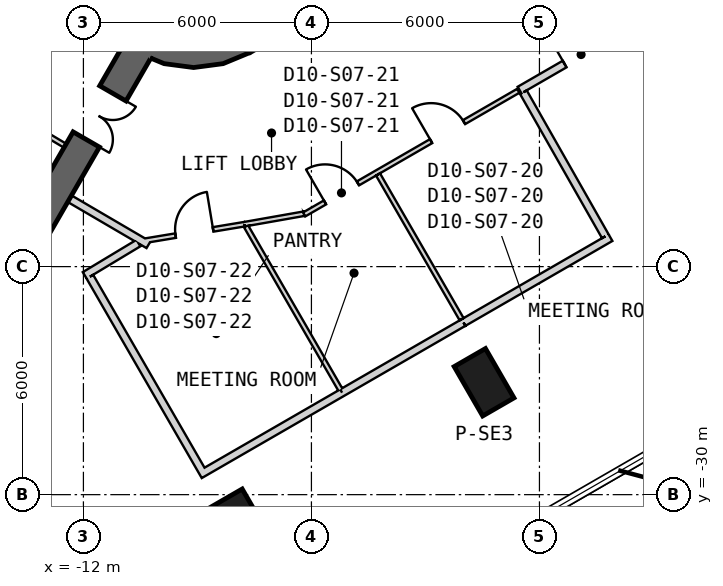
"""IFC4 building model, lengths in metres.
Left out: names, types, materials, properties, quantities, classifications, styles, units other than length and angle.
Written with IfcOpenShell. Run it as: python <this file> out.ifc"""

import sys

from ifc_helpers import new_model, si_unit, direction, frame, frame_2d, origin, origin_2d, place, context, subcontext, project, spatial, polyline, rectangle, outline, extrude, element, fill, save


model = new_model("IFC4")
c1 = context("Model", 3, precision=1e-05, world=origin(), true_north=direction((0.0, 1.0)))
c2 = subcontext(c1, "Body", "Model", "MODEL_VIEW")
j1 = project(units=[si_unit("LENGTHUNIT", "METRE"), si_unit("PLANEANGLEUNIT", "RADIAN")], contexts=[c1])
p1 = place(None, origin())
s1 = spatial("IfcSite", under=j1, at=p1, CompositionType="ELEMENT")
p2 = place(p1, origin())
s2 = spatial("IfcBuilding", under=s1, at=p2, CompositionType="ELEMENT")
p3 = place(p2, frame((0.0, 0.0, 131.6)))
s3 = spatial("IfcBuildingStorey", under=s2, at=p3, CompositionType="ELEMENT", Elevation=131.6)
for number, where, z_axis, x_axis in (
    (1, (-7.858, -30.738, 0.0), (0.0, 0.0, 1.0), (0.5, -0.866, 0.0)),
    (2, (-1.457, -27.043, 0.0), (0.0, 0.0, 1.0), (0.5, -0.866, 0.0)),
):
    element("IfcColumn", number, at=place(p3, frame(where, z_axis=z_axis, x_axis=x_axis)), inside=s3, PredefinedType="COLUMN", context=c2, shape_type="SweptSolid", body=[
        extrude(rectangle(XDim=1.5, YDim=0.95, at=origin_2d()), origin(), (0.0, 0.0, 1.0), 4.1),
    ])
p4 = place(p3, frame((-7.825, -17.97, 0.0), z_axis=(0.0, 0.0, 1.0), x_axis=(0.866028369851, 0.499994862586, 0.0)))
e3 = element("IfcWall", 3, at=p4, inside=s3, PredefinedType="SHEAR", context=c2, shape_type="SweptSolid", body=[
    extrude(rectangle(XDim=31.523, YDim=0.9, at=frame_2d((15.762, 0.0))), origin(), (0.0, 0.0, 1.0), 4.1),
])
p5 = place(p4, frame((7.062, 0.0, 0.0)))
e4 = element("IfcOpeningElement", 4, at=p5, cuts=e3, PredefinedType="OPENING", context=c2, shape_type="SweptSolid", body=[
    extrude(rectangle(XDim=1.2, YDim=2.4, at=frame_2d((0.6, 1.2))), frame((0.0, 0.46, 0.0), z_axis=(0.0, -1.0, 0.0), x_axis=(1.0, 0.0, 0.0)), (0.0, 0.0, 1.0), 0.92),
])
p6 = place(p4, frame((9.762, 0.0, 0.0)))
e5 = element("IfcOpeningElement", 5, at=p6, cuts=e3, PredefinedType="OPENING", context=c2, shape_type="SweptSolid", body=[
    extrude(rectangle(XDim=1.2, YDim=2.4, at=frame_2d((0.6, 1.2))), frame((0.0, 0.46, 0.0), z_axis=(0.0, -1.0, 0.0), x_axis=(1.0, 0.0, 0.0)), (0.0, 0.0, 1.0), 0.92),
])
p7 = place(p4, frame((12.462, 0.0, 0.0)))
e6 = element("IfcOpeningElement", 6, at=p7, cuts=e3, PredefinedType="OPENING", context=c2, shape_type="SweptSolid", body=[
    extrude(rectangle(XDim=1.2, YDim=2.4, at=frame_2d((0.6, 1.2))), frame((0.0, 0.46, 0.0), z_axis=(0.0, -1.0, 0.0), x_axis=(1.0, 0.0, 0.0)), (0.0, 0.0, 1.0), 0.92),
])
p8 = place(p4, frame((15.162, 0.0, 0.0)))
e7 = element("IfcOpeningElement", 7, at=p8, cuts=e3, PredefinedType="OPENING", context=c2, shape_type="SweptSolid", body=[
    extrude(rectangle(XDim=1.2, YDim=2.4, at=frame_2d((0.6, 1.2))), frame((0.0, 0.46, 0.0), z_axis=(0.0, -1.0, 0.0), x_axis=(1.0, 0.0, 0.0)), (0.0, 0.0, 1.0), 0.92),
])
p9 = place(p4, frame((17.862, 0.0, 0.0)))
e8 = element("IfcOpeningElement", 8, at=p9, cuts=e3, PredefinedType="OPENING", context=c2, shape_type="SweptSolid", body=[
    extrude(rectangle(XDim=1.2, YDim=2.4, at=frame_2d((0.6, 1.2))), frame((0.0, 0.46, 0.0), z_axis=(0.0, -1.0, 0.0), x_axis=(1.0, 0.0, 0.0)), (0.0, 0.0, 1.0), 0.92),
])
p10 = place(p4, frame((20.562, 0.0, 0.0)))
e9 = element("IfcOpeningElement", 9, at=p10, cuts=e3, PredefinedType="OPENING", context=c2, shape_type="SweptSolid", body=[
    extrude(rectangle(XDim=1.2, YDim=2.4, at=frame_2d((0.6, 1.2))), frame((0.0, 0.46, 0.0), z_axis=(0.0, -1.0, 0.0), x_axis=(1.0, 0.0, 0.0)), (0.0, 0.0, 1.0), 0.92),
])
p11 = place(p4, frame((26.712, 0.0, 0.0)))
e10 = element("IfcOpeningElement", 10, at=p11, cuts=e3, PredefinedType="OPENING", context=c2, shape_type="SweptSolid", body=[
    extrude(rectangle(XDim=1.2, YDim=2.4, at=frame_2d((0.6, 1.2))), frame((0.0, 0.46, 0.0), z_axis=(0.0, -1.0, 0.0), x_axis=(1.0, 0.0, 0.0)), (0.0, 0.0, 1.0), 0.92),
])
p12 = place(p4, frame((3.612, 0.0, 0.0)))
e11 = element("IfcOpeningElement", 11, at=p12, cuts=e3, PredefinedType="OPENING", context=c2, shape_type="SweptSolid", body=[
    extrude(rectangle(XDim=1.2, YDim=2.4, at=frame_2d((0.6, 1.2))), frame((0.0, 0.46, 0.0), z_axis=(0.0, -1.0, 0.0), x_axis=(1.0, 0.0, 0.0)), (0.0, 0.0, 1.0), 0.92),
])
p13 = place(p3, origin())
e12 = element("IfcWall", 12, at=p13, inside=s3, PredefinedType="SHEAR", context=c2, shape_type="SweptSolid", body=[
    extrude(outline(polyline([(-12.1, -15.762), (-11.998, -16.538), (-11.698, -17.262), (-11.221, -17.883), (-10.6, -18.36), (-9.876, -18.659), (-9.1, -18.762), (-8.323, -18.659), (-7.6, -18.36), (-8.05, -17.58), (-8.556, -17.79), (-9.1, -17.862), (-9.644, -17.79), (-10.15, -17.58), (-10.585, -17.247), (-10.919, -16.812), (-11.128, -16.305), (-11.2, -15.762), (-12.1, -15.762)])), origin(), (0.0, 0.0, 1.0), 4.1),
])
p14 = place(p3, frame((-10.575, -18.316, 0.0), z_axis=(0.0, 0.0, 1.0), x_axis=(-0.500005394759, -0.866022289097, 0.0)))
e13 = element("IfcWall", 13, at=p14, inside=s3, PredefinedType="SHEAR", context=c2, shape_type="SweptSolid", body=[
    extrude(rectangle(XDim=12.598, YDim=0.8, at=frame_2d((6.299, 0.0))), origin(), (0.0, 0.0, 1.0), 4.1),
])
p15 = place(p14, frame((1.3, 0.0, 0.0)))
e14 = element("IfcOpeningElement", 14, at=p15, cuts=e13, PredefinedType="OPENING", context=c2, shape_type="SweptSolid", body=[
    extrude(rectangle(XDim=1.4, YDim=2.4, at=frame_2d((0.7, 1.2))), frame((0.0, 0.41, 0.0), z_axis=(0.0, -1.0, 0.0), x_axis=(1.0, 0.0, 0.0)), (0.0, 0.0, 1.0), 0.82),
])
p16 = place(p3, frame((-14.005, -19.912, 0.0), z_axis=(0.0, 0.0, 1.0), x_axis=(0.859128591272, -0.511759771435, 0.0)))
e15 = element("IfcWall", 15, at=p16, inside=s3, PredefinedType="PARTITIONING", context=c2, shape_type="SweptSolid", body=[
    extrude(rectangle(XDim=1.773, YDim=0.12, at=frame_2d((0.887, 0.0))), origin(), (0.0, 0.0, 1.0), 3.8),
])
p17 = place(p3, frame((-0.523, -19.354, 0.0), z_axis=(0.0, 0.0, 1.0), x_axis=(0.866024925705, 0.500000828058, 0.0)))
e16 = element("IfcWall", 16, at=p17, inside=s3, PredefinedType="PARTITIONING", context=c2, shape_type="SweptSolid", body=[
    extrude(rectangle(XDim=26.647, YDim=0.2, at=frame_2d((13.323, 0.0))), origin(), (0.0, 0.0, 1.0), 2.98),
])
p18 = place(p17, frame((21.145, 0.0, 0.0)))
e17 = element("IfcOpeningElement", 17, at=p18, cuts=e16, PredefinedType="OPENING", context=c2, shape_type="SweptSolid", body=[
    extrude(rectangle(XDim=1.0, YDim=2.1, at=frame_2d((0.5, 1.05))), frame((0.0, 0.11, 0.0), z_axis=(0.0, -1.0, 0.0), x_axis=(1.0, 0.0, 0.0)), (0.0, 0.0, 1.0), 0.22),
])
p19 = place(p17, frame((9.691, 0.0, 0.0)))
e18 = element("IfcOpeningElement", 18, at=p19, cuts=e16, PredefinedType="OPENING", context=c2, shape_type="SweptSolid", body=[
    extrude(rectangle(XDim=1.0, YDim=2.1, at=frame_2d((0.5, 1.05))), frame((0.0, 0.11, 0.0), z_axis=(0.0, -1.0, 0.0), x_axis=(1.0, 0.0, 0.0)), (0.0, 0.0, 1.0), 0.22),
])
p20 = place(p17, frame((1.369, 0.0, 0.0)))
e19 = element("IfcOpeningElement", 19, at=p20, cuts=e16, PredefinedType="OPENING", context=c2, shape_type="SweptSolid", body=[
    extrude(rectangle(XDim=1.0, YDim=2.1, at=frame_2d((0.5, 1.05))), frame((0.0, 0.11, 0.0), z_axis=(0.0, -1.0, 0.0), x_axis=(1.0, 0.0, 0.0)), (0.0, 0.0, 1.0), 0.22),
])
p21 = place(p3, frame((-12.363, -22.213, 0.0), z_axis=(0.0, 0.0, 1.0), x_axis=(0.863185097125, -0.504887599472, 0.0)))
e20 = element("IfcWall", 20, at=p21, inside=s3, PredefinedType="PARTITIONING", context=c2, shape_type="SweptSolid", body=[
    extrude(rectangle(XDim=2.403, YDim=0.2, at=frame_2d((1.202, 0.0))), origin(), (0.0, 0.0, 1.0), 3.8),
])
p22 = place(p3, frame((-6.193, -22.628, 0.0), z_axis=(0.0, 0.0, 1.0), x_axis=(0.866031884678, 0.499988774596, 0.0)))
e21 = element("IfcWall", 21, at=p22, inside=s3, PredefinedType="PARTITIONING", context=c2, shape_type="SweptSolid", body=[
    extrude(rectangle(XDim=6.507, YDim=0.12, at=frame_2d((3.253, 0.0))), origin(), (0.0, 0.0, 1.0), 2.98),
])
p23 = place(p22, frame((3.859, 0.0, 0.0)))
e22 = element("IfcOpeningElement", 22, at=p23, cuts=e21, PredefinedType="OPENING", context=c2, shape_type="SweptSolid", body=[
    extrude(rectangle(XDim=1.0, YDim=2.1, at=frame_2d((0.5, 1.05))), frame((0.0, 0.07, 0.0), z_axis=(0.0, -1.0, 0.0), x_axis=(1.0, 0.0, 0.0)), (0.0, 0.0, 1.0), 0.14),
])
p24 = place(p22, frame((0.635, 0.0, 0.0)))
e23 = element("IfcOpeningElement", 23, at=p24, cuts=e21, PredefinedType="OPENING", context=c2, shape_type="SweptSolid", body=[
    extrude(rectangle(XDim=1.0, YDim=2.1, at=frame_2d((0.5, 1.05))), frame((0.0, 0.07, 0.0), z_axis=(0.0, -1.0, 0.0), x_axis=(1.0, 0.0, 0.0)), (0.0, 0.0, 1.0), 0.14),
])
p25 = place(p3, frame((-7.763, -22.884, 0.0), z_axis=(0.0, 0.0, 1.0), x_axis=(0.984808322643, 0.173644947097, 0.0)))
e24 = element("IfcWall", 24, at=p25, inside=s3, PredefinedType="PARTITIONING", context=c2, shape_type="SweptSolid", body=[
    extrude(rectangle(XDim=1.587, YDim=0.12, at=frame_2d((0.794, 0.0))), origin(), (0.0, 0.0, 1.0), 3.8),
])
p26 = place(p3, frame((-10.398, -23.321, 0.0), z_axis=(0.0, 0.0, 1.0), x_axis=(0.986499922069, 0.16376172861, 0.0)))
e25 = element("IfcWall", 25, at=p26, inside=s3, PredefinedType="PARTITIONING", context=c2, shape_type="SweptSolid", body=[
    extrude(rectangle(XDim=2.672, YDim=0.12, at=frame_2d((1.336, 0.0))), origin(), (0.0, 0.0, 1.0), 2.88),
])
p27 = place(p26, frame((0.836, 0.0, 0.0)))
e26 = element("IfcOpeningElement", 26, at=p27, cuts=e25, PredefinedType="OPENING", context=c2, shape_type="SweptSolid", body=[
    extrude(rectangle(XDim=1.0, YDim=2.1, at=frame_2d((0.5, 1.05))), frame((0.0, 0.07, 0.0), z_axis=(0.0, -1.0, 0.0), x_axis=(1.0, 0.0, 0.0)), (0.0, 0.0, 1.0), 0.14),
])
p28 = place(p3, frame((7.714, -26.146, 0.0), z_axis=(0.0, 0.0, 1.0), x_axis=(-0.499926679301, 0.866067731372, 0.0)))
e27 = element("IfcWall", 27, at=p28, inside=s3, PredefinedType="PARTITIONING", context=c2, shape_type="SweptSolid", body=[
    extrude(rectangle(XDim=9.9, YDim=0.2, at=frame_2d((4.95, 0.0))), origin(), (0.0, 0.0, 1.0), 3.08),
])
p29 = place(p3, frame((1.87, -23.239, 0.0), z_axis=(0.0, 0.0, 1.0), x_axis=(-0.866020802127, -0.50000797022, 0.0)))
e28 = element("IfcWall", 28, at=p29, inside=s3, PredefinedType="PARTITIONING", context=c2, shape_type="SweptSolid", body=[
    extrude(rectangle(XDim=4.466, YDim=0.2, at=frame_2d((2.233, 0.0))), origin(), (0.0, 0.0, 1.0), 3.08),
])
p30 = place(p3, frame((-1.998, -25.471, 0.0), z_axis=(0.0, 0.0, 1.0), x_axis=(-0.866019184983, -0.500010771126, 0.0)))
e29 = element("IfcWall", 29, at=p30, inside=s3, PredefinedType="PARTITIONING", context=c2, shape_type="SweptSolid", body=[
    extrude(rectangle(XDim=3.689, YDim=0.2, at=frame_2d((1.845, 0.0))), origin(), (0.0, 0.0, 1.0), 3.8),
])
p31 = place(p3, frame((-5.193, -27.316, 0.0), z_axis=(0.0, 0.0, 1.0), x_axis=(-0.866040610509, -0.499973660256, 0.0)))
e30 = element("IfcWall", 30, at=p31, inside=s3, PredefinedType="PARTITIONING", context=c2, shape_type="SweptSolid", body=[
    extrude(rectangle(XDim=4.122, YDim=0.2, at=frame_2d((2.061, 0.0))), origin(), (0.0, 0.0, 1.0), 2.98),
])
p32 = place(p3, frame((1.734, -23.202, 0.0), z_axis=(0.0, 0.0, 1.0), x_axis=(-0.494262399959, 0.869312763041, 0.0)))
e31 = element("IfcWall", 31, at=p32, inside=s3, PredefinedType="PARTITIONING", context=c2, shape_type="SweptSolid", body=[
    extrude(rectangle(XDim=4.36, YDim=0.2, at=frame_2d((2.18, 0.0))), origin(), (0.0, 0.0, 1.0), 3.8),
])
p33 = place(p3, frame((-10.553, -23.38, 0.0), z_axis=(0.0, 0.0, 1.0), x_axis=(-0.856707917583, -0.515801845625, 0.0)))
e32 = element("IfcWall", 32, at=p33, inside=s3, PredefinedType="PARTITIONING", context=c2, shape_type="SweptSolid", body=[
    extrude(rectangle(XDim=1.649, YDim=0.2, at=frame_2d((0.824, 0.0))), origin(), (0.0, 0.0, 1.0), 3.8),
])
p34 = place(p3, frame((-11.83, -24.266, 0.0), z_axis=(0.0, 0.0, 1.0), x_axis=(0.499990973765, -0.866030615021, 0.0)))
e33 = element("IfcWall", 33, at=p34, inside=s3, PredefinedType="PARTITIONING", context=c2, shape_type="SweptSolid", body=[
    extrude(rectangle(XDim=6.06, YDim=0.2, at=frame_2d((3.03, 0.0))), origin(), (0.0, 0.0, 1.0), 2.88),
])
p35 = place(p3, frame((-4.248, -21.574, 0.0), z_axis=(0.0, 0.0, 1.0), x_axis=(0.499988222896, -0.866032203192, 0.0)))
e34 = element("IfcWall", 34, at=p35, inside=s3, PredefinedType="PARTITIONING", context=c2, shape_type="SweptSolid", body=[
    extrude(rectangle(XDim=4.4, YDim=0.12, at=frame_2d((2.2, 0.0))), origin(), (0.0, 0.0, 1.0), 3.8),
])
p36 = place(p3, frame((-5.243, -27.229, 0.0), z_axis=(0.0, 0.0, 1.0), x_axis=(-0.500006734102, 0.866021515814, 0.0)))
e35 = element("IfcWall", 35, at=p36, inside=s3, PredefinedType="PARTITIONING", context=c2, shape_type="SweptSolid", body=[
    extrude(rectangle(XDim=4.956, YDim=0.12, at=frame_2d((2.478, 0.0))), origin(), (0.0, 0.0, 1.0), 2.98),
])
p37 = place(p23, origin())
e36 = element("IfcDoor", 36, at=p37, inside=s3, OperationType="SINGLE_SWING_RIGHT", PredefinedType="NOTDEFINED", context=c2, shape_type="SweptSolid", body=[
    extrude(rectangle(XDim=1.0, YDim=2.1, at=frame_2d((0.5, 1.05))), frame((0.0, 0.025, 0.0), z_axis=(0.0, -1.0, 0.0), x_axis=(1.0, 0.0, 0.0)), (0.0, 0.0, 1.0), 0.05),
])
fill(e22, e36)
p38 = place(p24, origin())
e37 = element("IfcDoor", 37, at=p38, inside=s3, OperationType="SINGLE_SWING_LEFT", PredefinedType="NOTDEFINED", context=c2, shape_type="SweptSolid", body=[
    extrude(rectangle(XDim=1.0, YDim=2.1, at=frame_2d((0.5, 1.05))), frame((0.0, 0.025, 0.0), z_axis=(0.0, -1.0, 0.0), x_axis=(1.0, 0.0, 0.0)), (0.0, 0.0, 1.0), 0.05),
])
fill(e23, e37)
p39 = place(p27, origin())
e38 = element("IfcDoor", 38, at=p39, inside=s3, OperationType="SINGLE_SWING_RIGHT", PredefinedType="NOTDEFINED", context=c2, shape_type="SweptSolid", body=[
    extrude(rectangle(XDim=1.0, YDim=2.1, at=frame_2d((0.5, 1.05))), frame((0.0, 0.025, 0.0), z_axis=(0.0, -1.0, 0.0), x_axis=(1.0, 0.0, 0.0)), (0.0, 0.0, 1.0), 0.05),
])
fill(e26, e38)
p40 = place(p20, origin())
e39 = element("IfcDoor", 39, at=p40, inside=s3, OperationType="SINGLE_SWING_LEFT", PredefinedType="USERDEFINED", context=c2, shape_type="SweptSolid", body=[
    extrude(rectangle(XDim=1.0, YDim=2.1, at=frame_2d((0.5, 1.05))), frame((0.0, 0.025, 0.0), z_axis=(0.0, -1.0, 0.0), x_axis=(1.0, 0.0, 0.0)), (0.0, 0.0, 1.0), 0.05),
])
fill(e19, e39)
p41 = place(p15, origin())
e40 = element("IfcDoor", 40, at=p41, inside=s3, OperationType="DOUBLE_DOOR_SINGLE_SWING", PredefinedType="NOTDEFINED", context=c2, shape_type="SweptSolid", body=[
    extrude(rectangle(XDim=1.4, YDim=2.4, at=frame_2d((0.7, 1.2))), frame((0.0, 0.025, 0.0), z_axis=(0.0, -1.0, 0.0), x_axis=(1.0, 0.0, 0.0)), (0.0, 0.0, 1.0), 0.05),
])
fill(e14, e40)
save(model, sys.argv[1])
